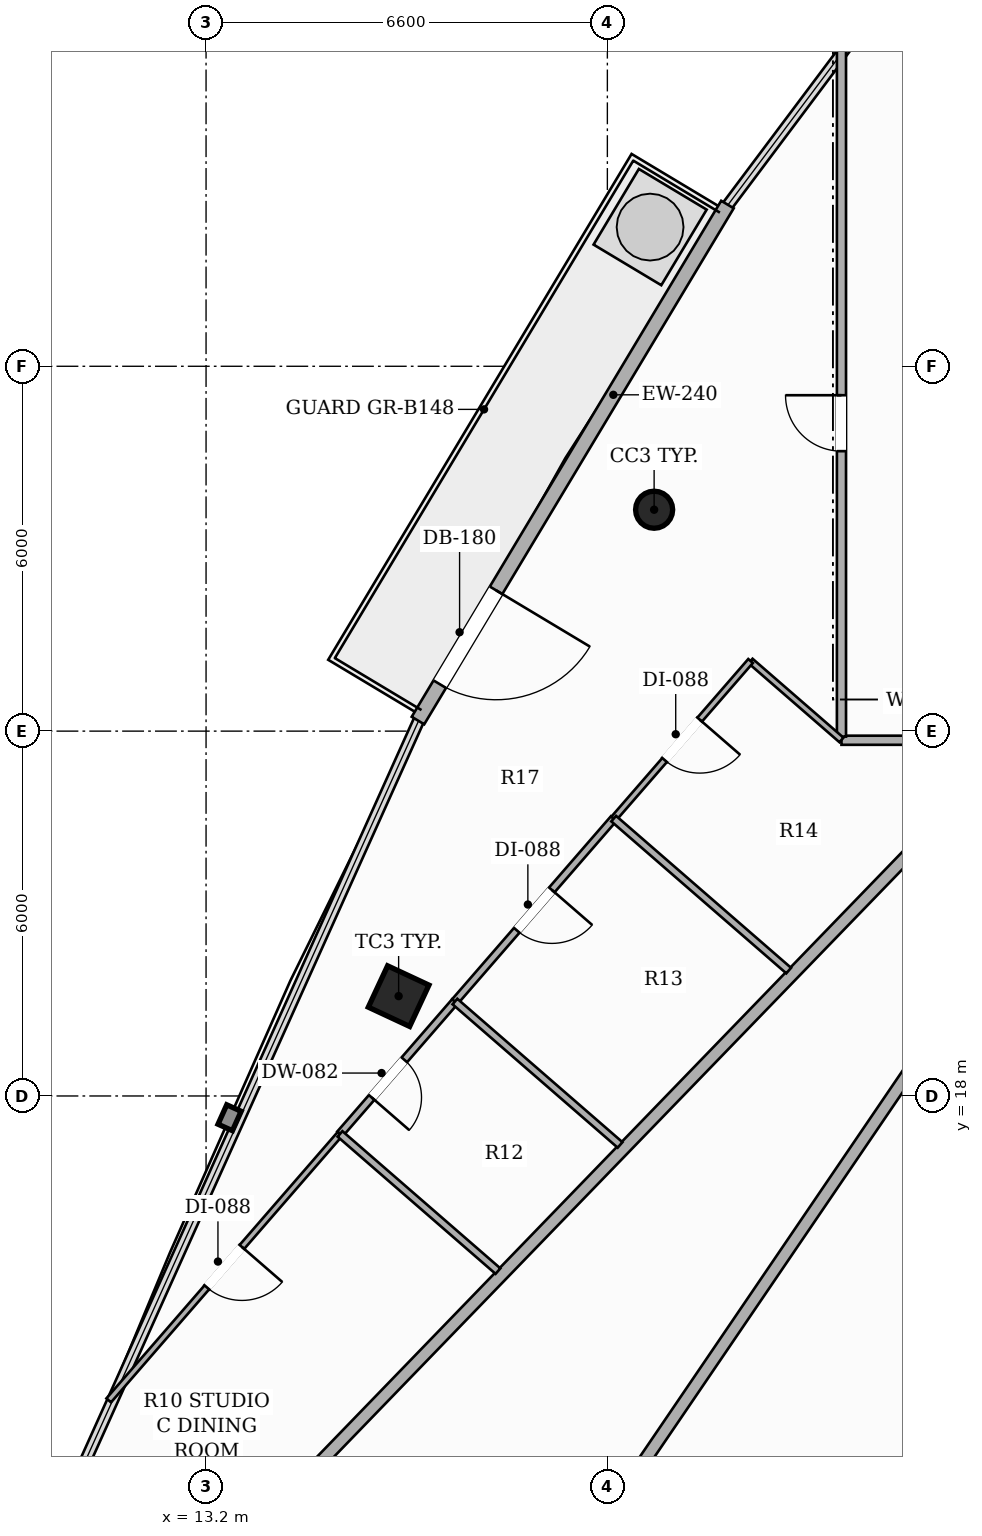
"""IFC4 building model, lengths in metres.
Left out: names, types, materials, properties, quantities, classifications, styles, units other than length and angle.
Written with IfcOpenShell. Run it as: python <this file> out.ifc"""

import sys

from ifc_helpers import new_model, si_unit, direction, frame, frame_2d, origin, origin_2d, place, context, subcontext, project, spatial, rectangle, hollow_rectangle, hollow_circle, extrude, element, fill, save


model = new_model("IFC4")
c1 = context("Model", 3, precision=1e-05, world=origin(), true_north=direction((0.0, 1.0)))
c2 = subcontext(c1, "Body", "Model", "MODEL_VIEW")
j1 = project(units=[si_unit("LENGTHUNIT", "METRE"), si_unit("PLANEANGLEUNIT", "RADIAN")], contexts=[c1])
p1 = place(None, origin())
s1 = spatial("IfcSite", under=j1, at=p1, CompositionType="ELEMENT")
p2 = place(p1, origin())
s2 = spatial("IfcBuilding", under=s1, at=p2, CompositionType="ELEMENT")
p3 = place(p2, frame((0.0, 0.0, 246.95)))
s3 = spatial("IfcBuildingStorey", under=s2, at=p3, CompositionType="ELEMENT", Elevation=246.95)
p4 = place(p3, frame((20.569, 27.641, 0.0), z_axis=(0.0, 0.0, 1.0), x_axis=(1.0, 0.0, 0.0)))
e1 = element("IfcColumn", 1, at=p4, inside=s3, PredefinedType="COLUMN", context=c2, shape_type="SweptSolid", body=[
    extrude(hollow_circle(Radius=0.305, WallThickness=0.016, at=origin_2d()), origin(), (0.0, 0.0, 1.0), 3.3),
])
p5 = place(p3, frame((16.367, 19.642, 0.0), z_axis=(0.0, 0.0, 1.0), x_axis=(0.422618261741, 0.906307787037, 0.0)))
e2 = element("IfcColumn", 2, at=p5, inside=s3, PredefinedType="COLUMN", context=c2, shape_type="SweptSolid", body=[
    extrude(hollow_rectangle(XDim=0.75, YDim=0.75, WallThickness=0.025, at=origin_2d()), origin(), (0.0, 0.0, 1.0), 3.3),
])
p6 = place(p3, frame((21.775, 32.66, 0.0), z_axis=(0.0, 0.0, 1.0), x_axis=(-0.514372387577, -0.857566934354, 0.0)))
e3 = element("IfcWall", 3, at=p6, inside=s3, PredefinedType="SOLIDWALL", context=c2, shape_type="SweptSolid", body=[
    extrude(rectangle(XDim=9.895, YDim=0.24, at=frame_2d((4.948, 0.0))), origin(), (0.0, 0.0, 1.0), 2.624),
])
p7 = place(p6, frame((7.398, 0.0, 0.0)))
e4 = element("IfcOpeningElement", 4, at=p7, cuts=e3, PredefinedType="OPENING", context=c2, shape_type="SweptSolid", body=[
    extrude(rectangle(XDim=1.8, YDim=2.2, at=frame_2d((0.9, 1.1))), frame((0.0, 0.13, 0.0), z_axis=(0.0, -1.0, 0.0), x_axis=(1.0, 0.0, 0.0)), (0.0, 0.0, 1.0), 0.26),
])
p8 = place(p3, frame((32.141, 23.85, 0.0), z_axis=(0.0, 0.0, 1.0), x_axis=(-1.0, 0.0, 0.0)))
e5 = element("IfcWall", 5, at=p8, inside=s3, PredefinedType="PARTITIONING", context=c2, shape_type="SweptSolid", body=[
    extrude(rectangle(XDim=8.491, YDim=0.15, at=frame_2d((4.246, 0.0))), origin(), (0.0, 0.0, 1.0), 2.565),
])
p9 = place(p8, frame((0.848, 0.0, 0.0)))
e6 = element("IfcOpeningElement", 6, at=p9, cuts=e5, PredefinedType="OPENING", context=c2, shape_type="SweptSolid", body=[
    extrude(rectangle(XDim=0.88, YDim=2.1, at=frame_2d((0.44, 1.05))), frame((0.0, 0.085, 0.0), z_axis=(0.0, -1.0, 0.0), x_axis=(1.0, 0.0, 0.0)), (0.0, 0.0, 1.0), 0.17),
])
p10 = place(p8, frame((2.616, 0.0, 0.0)))
e7 = element("IfcOpeningElement", 7, at=p10, cuts=e5, PredefinedType="OPENING", context=c2, shape_type="SweptSolid", body=[
    extrude(rectangle(XDim=0.88, YDim=2.1, at=frame_2d((0.44, 1.05))), frame((0.0, 0.085, 0.0), z_axis=(0.0, -1.0, 0.0), x_axis=(1.0, 0.0, 0.0)), (0.0, 0.0, 1.0), 0.17),
])
p11 = place(p8, frame((4.567, 0.0, 0.0)))
e8 = element("IfcOpeningElement", 8, at=p11, cuts=e5, PredefinedType="OPENING", context=c2, shape_type="SweptSolid", body=[
    extrude(rectangle(XDim=0.88, YDim=2.1, at=frame_2d((0.44, 1.05))), frame((0.0, 0.085, 0.0), z_axis=(0.0, -1.0, 0.0), x_axis=(1.0, 0.0, 0.0)), (0.0, 0.0, 1.0), 0.17),
])
p12 = place(p3, frame((23.65, 23.91, 0.0), z_axis=(0.0, 0.0, 1.0), x_axis=(0.0, 1.0, 0.0)))
e9 = element("IfcWall", 9, at=p12, inside=s3, PredefinedType="PARTITIONING", context=c2, shape_type="SweptSolid", body=[
    extrude(rectangle(XDim=11.337, YDim=0.15, at=frame_2d((5.668, 0.0))), origin(), (0.0, 0.0, 1.0), 2.492),
])
p13 = place(p12, frame((4.694, 0.0, 0.0)))
e10 = element("IfcOpeningElement", 10, at=p13, cuts=e9, PredefinedType="OPENING", context=c2, shape_type="SweptSolid", body=[
    extrude(rectangle(XDim=0.92, YDim=2.15, at=frame_2d((0.46, 1.075))), frame((0.0, 0.085, 0.0), z_axis=(0.0, -1.0, 0.0), x_axis=(1.0, 0.0, 0.0)), (0.0, 0.0, 1.0), 0.17),
])
p14 = place(p3, frame((26.508, 23.79, 0.0), z_axis=(0.0, 0.0, 1.0), x_axis=(-0.695365551949, -0.71865621069, 0.0)))
e11 = element("IfcWall", 11, at=p14, inside=s3, PredefinedType="PARTITIONING", context=c2, shape_type="SweptSolid", body=[
    extrude(rectangle(XDim=21.981, YDim=0.2, at=frame_2d((10.991, 0.0))), origin(), (0.0, 0.0, 1.0), 2.492),
])
p15 = place(p3, frame((22.717, 5.761, 0.0), z_axis=(0.0, 0.0, 1.0), x_axis=(0.383820587854, 0.923407686961, 0.0)))
e12 = element("IfcWall", 12, at=p15, inside=s3, PredefinedType="PARTITIONING", context=c2, shape_type="SweptSolid", body=[
    extrude(rectangle(XDim=19.524, YDim=0.2, at=frame_2d((9.762, 0.0))), origin(), (0.0, 0.0, 1.0), 2.492),
])
p16 = place(p3, frame((16.674, 6.511, 0.0), z_axis=(0.0, 0.0, 1.0), x_axis=(0.562645442508, 0.82669831621, 0.0)))
e13 = element("IfcWall", 13, at=p16, inside=s3, PredefinedType="PARTITIONING", context=c2, shape_type="SweptSolid", body=[
    extrude(rectangle(XDim=20.901, YDim=0.2, at=frame_2d((10.451, 0.0))), origin(), (0.0, 0.0, 1.0), 2.492),
])
p17 = place(p3, frame((17.293, 19.553, 0.0), z_axis=(0.0, 0.0, 1.0), x_axis=(-0.655555788219, -0.755146746357, 0.0)))
e14 = element("IfcWall", 14, at=p17, inside=s3, PredefinedType="PARTITIONING", context=c2, shape_type="SweptSolid", body=[
    extrude(rectangle(XDim=2.883, YDim=0.12, at=frame_2d((1.441, 0.0))), origin(), (0.0, 0.0, 1.0), 2.492),
])
p18 = place(p17, frame((1.269, 0.0, 0.0)))
e15 = element("IfcOpeningElement", 15, at=p18, cuts=e14, PredefinedType="OPENING", context=c2, shape_type="SweptSolid", body=[
    extrude(rectangle(XDim=0.82, YDim=2.1, at=frame_2d((0.41, 1.05))), frame((0.0, 0.07, 0.0), z_axis=(0.0, -1.0, 0.0), x_axis=(1.0, 0.0, 0.0)), (0.0, 0.0, 1.0), 0.14),
])
p19 = place(p3, frame((19.904, 22.561, 0.0), z_axis=(0.0, 0.0, 1.0), x_axis=(-0.655518370372, -0.755179227803, 0.0)))
e16 = element("IfcWall", 16, at=p19, inside=s3, PredefinedType="PARTITIONING", context=c2, shape_type="SweptSolid", body=[
    extrude(rectangle(XDim=3.983, YDim=0.12, at=frame_2d((1.992, 0.0))), origin(), (0.0, 0.0, 1.0), 2.773),
])
p20 = place(p19, frame((1.552, 0.0, 0.0)))
e17 = element("IfcOpeningElement", 17, at=p20, cuts=e16, PredefinedType="OPENING", context=c2, shape_type="SweptSolid", body=[
    extrude(rectangle(XDim=0.88, YDim=2.1, at=frame_2d((0.44, 1.05))), frame((0.0, 0.07, 0.0), z_axis=(0.0, -1.0, 0.0), x_axis=(1.0, 0.0, 0.0)), (0.0, 0.0, 1.0), 0.14),
])
p21 = place(p3, frame((15.403, 17.376, 0.0), z_axis=(0.0, 0.0, 1.0), x_axis=(-0.655535791639, -0.755164105265, 0.0)))
e18 = element("IfcWall", 18, at=p21, inside=s3, PredefinedType="PARTITIONING", context=c2, shape_type="SweptSolid", body=[
    extrude(rectangle(XDim=5.803, YDim=0.1, at=frame_2d((2.901, 0.0))), origin(), (0.0, 0.0, 1.0), 2.492),
])
p22 = place(p21, frame((2.461, 0.0, 0.0)))
e19 = element("IfcOpeningElement", 19, at=p22, cuts=e18, PredefinedType="OPENING", context=c2, shape_type="SweptSolid", body=[
    extrude(rectangle(XDim=0.88, YDim=2.1, at=frame_2d((0.44, 1.05))), frame((0.0, 0.06, 0.0), z_axis=(0.0, -1.0, 0.0), x_axis=(1.0, 0.0, 0.0)), (0.0, 0.0, 1.0), 0.12),
])
p23 = place(p3, frame((23.65, 23.855, 0.0), z_axis=(0.0, 0.0, 1.0), x_axis=(-0.755054003076, 0.655662605643, 0.0)))
e20 = element("IfcWall", 20, at=p23, inside=s3, PredefinedType="PARTITIONING", context=c2, shape_type="SweptSolid", body=[
    extrude(rectangle(XDim=1.98, YDim=0.1, at=frame_2d((0.99, 0.0))), origin(), (0.0, 0.0, 1.0), 2.773),
])
p24 = place(p3, frame((22.155, 25.153, 0.0), z_axis=(0.0, 0.0, 1.0), x_axis=(-0.655685588572, -0.755034044888, 0.0)))
e21 = element("IfcWall", 21, at=p24, inside=s3, PredefinedType="PARTITIONING", context=c2, shape_type="SweptSolid", body=[
    extrude(rectangle(XDim=3.433, YDim=0.1, at=frame_2d((1.717, 0.0))), origin(), (0.0, 0.0, 1.0), 2.773),
])
p25 = place(p24, frame((1.276, 0.0, 0.0)))
e22 = element("IfcOpeningElement", 22, at=p25, cuts=e21, PredefinedType="OPENING", context=c2, shape_type="SweptSolid", body=[
    extrude(rectangle(XDim=0.88, YDim=2.1, at=frame_2d((0.44, 1.05))), frame((0.0, 0.06, 0.0), z_axis=(0.0, -1.0, 0.0), x_axis=(1.0, 0.0, 0.0)), (0.0, 0.0, 1.0), 0.12),
])
p26 = place(p3, frame((17.293, 19.553, 0.0), z_axis=(0.0, 0.0, 1.0), x_axis=(0.755140110276, -0.655563432364, 0.0)))
e23 = element("IfcWall", 23, at=p26, inside=s3, PredefinedType="PARTITIONING", context=c2, shape_type="SweptSolid", body=[
    extrude(rectangle(XDim=3.597, YDim=0.12, at=frame_2d((1.798, 0.0))), origin(), (0.0, 0.0, 1.0), 2.565),
])
p27 = place(p3, frame((18.001, 15.12, 0.0), z_axis=(0.0, 0.0, 1.0), x_axis=(-0.755063624175, 0.655651525925, 0.0)))
e24 = element("IfcWall", 24, at=p27, inside=s3, PredefinedType="PARTITIONING", context=c2, shape_type="SweptSolid", body=[
    extrude(rectangle(XDim=3.441, YDim=0.12, at=frame_2d((1.72, 0.0))), origin(), (0.0, 0.0, 1.0), 2.492),
])
p28 = place(p3, frame((19.904, 22.561, 0.0), z_axis=(0.0, 0.0, 1.0), x_axis=(0.755063159293, -0.655652061293, 0.0)))
e25 = element("IfcWall", 25, at=p28, inside=s3, PredefinedType="PARTITIONING", context=c2, shape_type="SweptSolid", body=[
    extrude(rectangle(XDim=3.812, YDim=0.12, at=frame_2d((1.906, 0.0))), origin(), (0.0, 0.0, 1.0), 2.565),
])
p29 = place(p7, origin())
e26 = element("IfcDoor", 26, at=p29, inside=s3, OperationType="SINGLE_SWING_LEFT", PredefinedType="DOOR", context=c2, shape_type="SweptSolid", body=[
    extrude(rectangle(XDim=1.8, YDim=2.2, at=frame_2d((0.9, 1.1))), frame((0.0, 0.025, 0.0), z_axis=(0.0, -1.0, 0.0), x_axis=(1.0, 0.0, 0.0)), (0.0, 0.0, 1.0), 0.05),
])
fill(e4, e26)
p30 = place(p13, origin())
e27 = element("IfcDoor", 27, at=p30, inside=s3, OperationType="SINGLE_SWING_RIGHT", PredefinedType="DOOR", context=c2, shape_type="SweptSolid", body=[
    extrude(rectangle(XDim=0.92, YDim=2.15, at=frame_2d((0.46, 1.075))), frame((0.0, 0.025, 0.0), z_axis=(0.0, -1.0, 0.0), x_axis=(1.0, 0.0, 0.0)), (0.0, 0.0, 1.0), 0.05),
])
fill(e10, e27)
p31 = place(p18, origin())
e28 = element("IfcDoor", 28, at=p31, inside=s3, OperationType="SINGLE_SWING_RIGHT", PredefinedType="DOOR", context=c2, shape_type="SweptSolid", body=[
    extrude(rectangle(XDim=0.82, YDim=2.1, at=frame_2d((0.41, 1.05))), frame((0.0, 0.025, 0.0), z_axis=(0.0, -1.0, 0.0), x_axis=(1.0, 0.0, 0.0)), (0.0, 0.0, 1.0), 0.05),
])
fill(e15, e28)
p32 = place(p20, origin())
e29 = element("IfcDoor", 29, at=p32, inside=s3, OperationType="SINGLE_SWING_LEFT", PredefinedType="DOOR", context=c2, shape_type="SweptSolid", body=[
    extrude(rectangle(XDim=0.88, YDim=2.1, at=frame_2d((0.44, 1.05))), frame((0.0, 0.025, 0.0), z_axis=(0.0, -1.0, 0.0), x_axis=(1.0, 0.0, 0.0)), (0.0, 0.0, 1.0), 0.05),
])
fill(e17, e29)
p33 = place(p22, origin())
e30 = element("IfcDoor", 30, at=p33, inside=s3, OperationType="SINGLE_SWING_LEFT", PredefinedType="DOOR", context=c2, shape_type="SweptSolid", body=[
    extrude(rectangle(XDim=0.88, YDim=2.1, at=frame_2d((0.44, 1.05))), frame((0.0, 0.025, 0.0), z_axis=(0.0, -1.0, 0.0), x_axis=(1.0, 0.0, 0.0)), (0.0, 0.0, 1.0), 0.05),
])
fill(e19, e30)
p34 = place(p25, origin())
e31 = element("IfcDoor", 31, at=p34, inside=s3, OperationType="SINGLE_SWING_LEFT", PredefinedType="DOOR", context=c2, shape_type="SweptSolid", body=[
    extrude(rectangle(XDim=0.88, YDim=2.1, at=frame_2d((0.44, 1.05))), frame((0.0, 0.025, 0.0), z_axis=(0.0, -1.0, 0.0), x_axis=(1.0, 0.0, 0.0)), (0.0, 0.0, 1.0), 0.05),
])
fill(e22, e31)
save(model, sys.argv[1])
